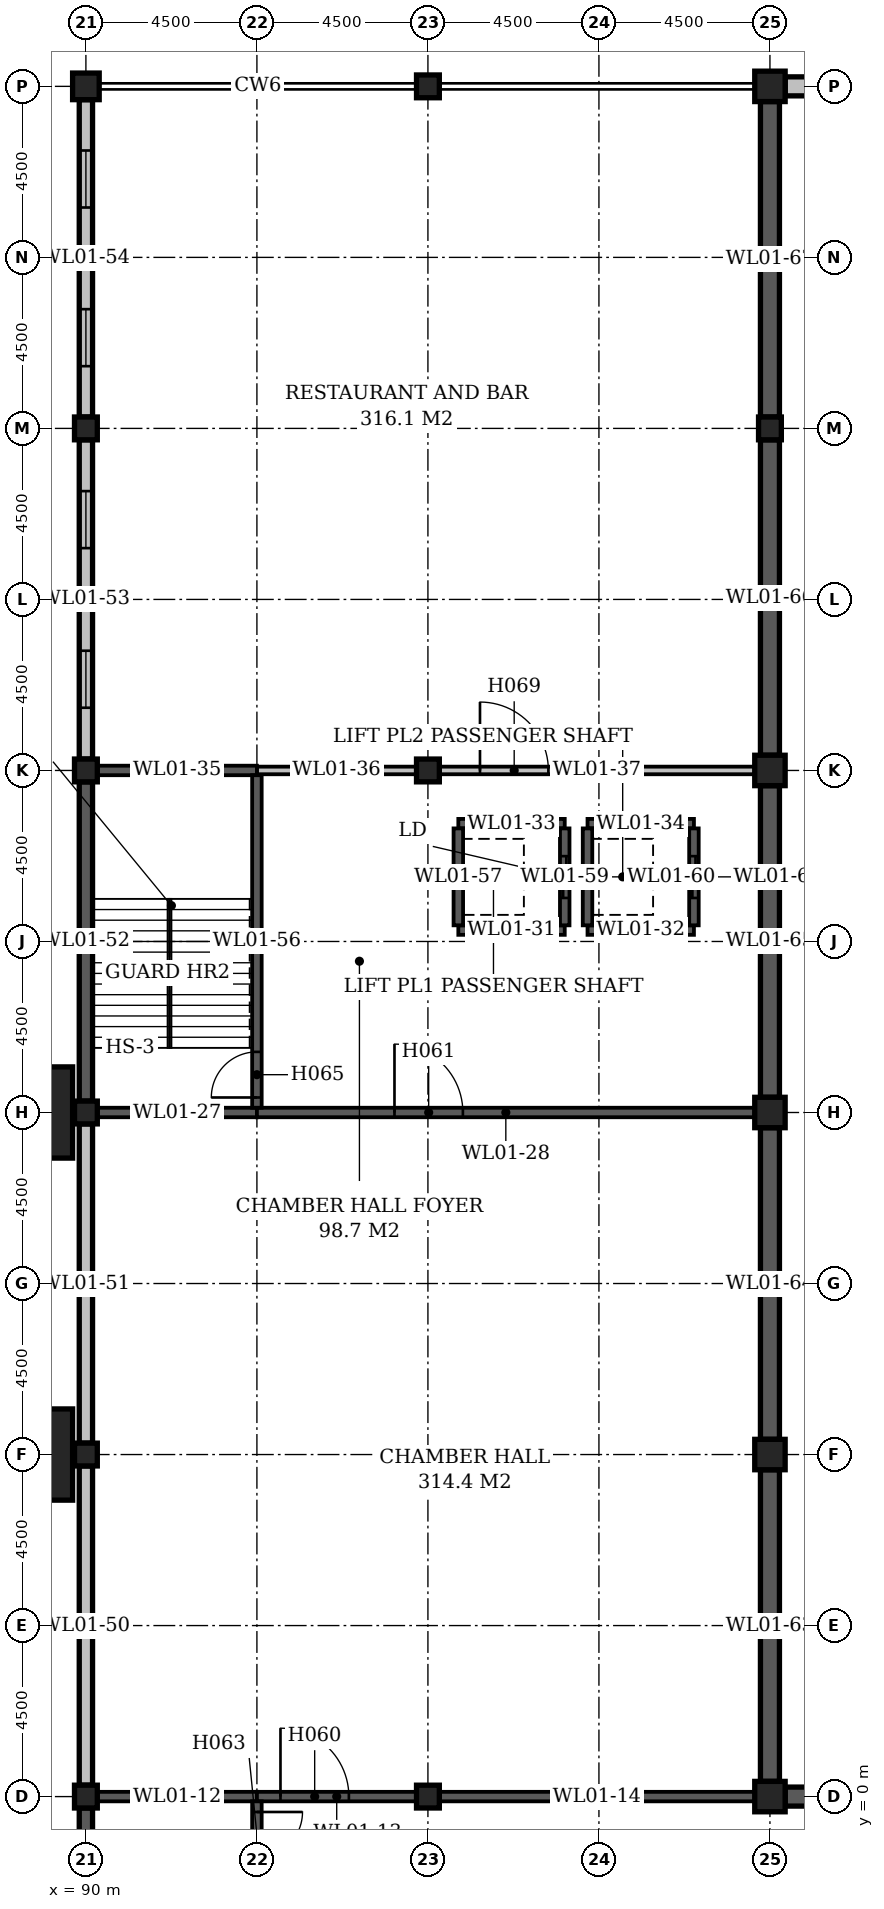
"""IFC4 building model, lengths in metres.
Left out: names, types, materials, properties, quantities, classifications, styles, units other than length and angle.
Written with IfcOpenShell. Run it as: python <this file> out.ifc"""

import sys

from ifc_helpers import new_model, si_unit, direction, frame, frame_2d, origin, origin_2d, place, context, subcontext, project, spatial, rectangle, extrude, element, fill, save


model = new_model("IFC4")
c1 = context("Model", 3, precision=1e-05, world=origin(), true_north=direction((0.0, 1.0)))
c2 = subcontext(c1, "Body", "Model", "MODEL_VIEW")
j1 = project(units=[si_unit("LENGTHUNIT", "METRE"), si_unit("PLANEANGLEUNIT", "RADIAN")], contexts=[c1])
p1 = place(None, origin())
s1 = spatial("IfcSite", under=j1, at=p1, CompositionType="ELEMENT")
p2 = place(p1, origin())
s2 = spatial("IfcBuilding", under=s1, at=p2, CompositionType="ELEMENT")
p3 = place(p2, frame((0.0, 0.0, 9.0)))
s3 = spatial("IfcBuildingStorey", under=s2, at=p3, CompositionType="ELEMENT", Elevation=9.0)
for number, where, z_axis, x_axis in (
    (1, (90.0, 0.0, 0.0), (0.0, 0.0, 1.0), (1.0, 0.0, 0.0)),
    (2, (90.0, 9.0, 0.0), (0.0, 0.0, 1.0), (1.0, 0.0, 0.0)),
    (3, (90.0, 18.0, 0.0), (0.0, 0.0, 1.0), (1.0, 0.0, 0.0)),
    (4, (90.0, 27.0, 0.0), (0.0, 0.0, 1.0), (1.0, 0.0, 0.0)),
    (5, (90.0, 36.0, 0.0), (0.0, 0.0, 1.0), (1.0, 0.0, 0.0)),
):
    element("IfcColumn", number, at=place(p3, frame(where, z_axis=z_axis, x_axis=x_axis)), inside=s3, PredefinedType="COLUMN", context=c2, shape_type="SweptSolid", body=[
        extrude(rectangle(XDim=0.6, YDim=0.6, at=origin_2d()), origin(), (0.0, 0.0, 1.0), 4.7),
    ])
p4 = place(p3, frame((90.0, 45.0, 0.0), z_axis=(0.0, 0.0, 1.0), x_axis=(1.0, 0.0, 0.0)))
e6 = element("IfcColumn", 6, at=p4, inside=s3, PredefinedType="COLUMN", context=c2, shape_type="SweptSolid", body=[
    extrude(rectangle(XDim=0.7, YDim=0.7, at=origin_2d()), origin(), (0.0, 0.0, 1.0), 4.7),
])
for number, where, z_axis, x_axis in (
    (7, (99.0, 0.0, 0.0), (0.0, 0.0, 1.0), (1.0, 0.0, 0.0)),
    (8, (99.0, 27.0, 0.0), (0.0, 0.0, 1.0), (1.0, 0.0, 0.0)),
    (9, (99.0, 45.0, 0.0), (0.0, 0.0, 1.0), (1.0, 0.0, 0.0)),
):
    element("IfcColumn", number, at=place(p3, frame(where, z_axis=z_axis, x_axis=x_axis)), inside=s3, PredefinedType="COLUMN", context=c2, shape_type="SweptSolid", body=[
        extrude(rectangle(XDim=0.6, YDim=0.6, at=origin_2d()), origin(), (0.0, 0.0, 1.0), 4.7),
    ])
for number, where, z_axis, x_axis in (
    (10, (108.0, 0.0, -0.3), (0.0, 0.0, 1.0), (1.0, 0.0, 0.0)),
    (11, (108.0, 9.0, -0.3), (0.0, 0.0, 1.0), (1.0, 0.0, 0.0)),
    (12, (108.0, 18.0, -0.3), (0.0, 0.0, 1.0), (1.0, 0.0, 0.0)),
    (13, (108.0, 27.0, -0.3), (0.0, 0.0, 1.0), (1.0, 0.0, 0.0)),
):
    element("IfcColumn", number, at=place(p3, frame(where, z_axis=z_axis, x_axis=x_axis)), inside=s3, PredefinedType="COLUMN", context=c2, shape_type="SweptSolid", body=[
        extrude(rectangle(XDim=0.8, YDim=0.8, at=origin_2d()), origin(), (0.0, 0.0, 1.0), 5.0),
    ])
p5 = place(p3, frame((108.0, 36.0, -0.3), z_axis=(0.0, 0.0, 1.0), x_axis=(1.0, 0.0, 0.0)))
e14 = element("IfcColumn", 14, at=p5, inside=s3, PredefinedType="COLUMN", context=c2, shape_type="SweptSolid", body=[
    extrude(rectangle(XDim=0.6, YDim=0.6, at=origin_2d()), origin(), (0.0, 0.0, 1.0), 5.0),
])
p6 = place(p3, frame((108.0, 45.0, -0.3), z_axis=(0.0, 0.0, 1.0), x_axis=(1.0, 0.0, 0.0)))
e15 = element("IfcColumn", 15, at=p6, inside=s3, PredefinedType="COLUMN", context=c2, shape_type="SweptSolid", body=[
    extrude(rectangle(XDim=0.8, YDim=0.8, at=origin_2d()), origin(), (0.0, 0.0, 1.0), 5.0),
])
p7 = place(p3, frame((90.3, 0.0, 0.0), z_axis=(0.0, 0.0, 1.0), x_axis=(1.0, 0.0, 0.0)))
e16 = element("IfcWall", 16, at=p7, inside=s3, PredefinedType="STANDARD", context=c2, shape_type="SweptSolid", body=[
    extrude(rectangle(XDim=4.2, YDim=0.25, at=frame_2d((2.1, 0.0))), origin(), (0.0, 0.0, 1.0), 5.0),
])
p8 = place(p3, frame((94.5, 0.0, 0.0), z_axis=(0.0, 0.0, 1.0), x_axis=(1.0, 0.0, 0.0)))
e17 = element("IfcWall", 17, at=p8, inside=s3, PredefinedType="STANDARD", context=c2, shape_type="SweptSolid", body=[
    extrude(rectangle(XDim=4.2, YDim=0.25, at=frame_2d((2.1, 0.0))), origin(), (0.0, 0.0, 1.0), 4.7),
])
p9 = place(p8, frame((0.62, 0.0, 0.0)))
e18 = element("IfcOpeningElement", 18, at=p9, cuts=e17, PredefinedType="OPENING", context=c2, shape_type="SweptSolid", body=[
    extrude(rectangle(XDim=1.8, YDim=2.4, at=frame_2d((0.9, 1.2))), frame((0.0, 0.137, 0.0), z_axis=(0.0, -1.0, 0.0), x_axis=(1.0, 0.0, 0.0)), (0.0, 0.0, 1.0), 0.274),
])
p10 = place(p3, frame((99.3, 0.0, 0.0), z_axis=(0.0, 0.0, 1.0), x_axis=(1.0, 0.0, 0.0)))
e19 = element("IfcWall", 19, at=p10, inside=s3, PredefinedType="STANDARD", context=c2, shape_type="SweptSolid", body=[
    extrude(rectangle(XDim=8.3, YDim=0.25, at=frame_2d((4.15, 0.0))), origin(), (0.0, 0.0, 1.0), 4.7),
])
p11 = place(p3, frame((108.4, 0.0, 0.0), z_axis=(0.0, 0.0, 1.0), x_axis=(1.0, 0.0, 0.0)))
e20 = element("IfcWall", 20, at=p11, inside=s3, PredefinedType="STANDARD", context=c2, shape_type="SweptSolid", body=[
    extrude(rectangle(XDim=8.3, YDim=0.5, at=frame_2d((4.15, 0.0))), origin(), (0.0, 0.0, 1.0), 5.0),
])
p12 = place(p3, frame((90.3, 18.0, 0.0), z_axis=(0.0, 0.0, 1.0), x_axis=(1.0, 0.0, 0.0)))
e21 = element("IfcWall", 21, at=p12, inside=s3, PredefinedType="STANDARD", context=c2, shape_type="SweptSolid", body=[
    extrude(rectangle(XDim=4.2, YDim=0.25, at=frame_2d((2.1, 0.0))), origin(), (0.0, 0.0, 1.0), 5.0),
])
p13 = place(p3, frame((94.5, 18.0, 0.0), z_axis=(0.0, 0.0, 1.0), x_axis=(1.0, 0.0, 0.0)))
e22 = element("IfcWall", 22, at=p13, inside=s3, PredefinedType="STANDARD", context=c2, shape_type="SweptSolid", body=[
    extrude(rectangle(XDim=13.1, YDim=0.25, at=frame_2d((6.55, 0.0))), origin(), (0.0, 0.0, 1.0), 4.7),
])
p14 = place(p13, frame((3.62, 0.0, 0.0)))
e23 = element("IfcOpeningElement", 23, at=p14, cuts=e22, PredefinedType="OPENING", context=c2, shape_type="SweptSolid", body=[
    extrude(rectangle(XDim=1.8, YDim=2.4, at=frame_2d((0.9, 1.2))), frame((0.0, 0.137, 0.0), z_axis=(0.0, -1.0, 0.0), x_axis=(1.0, 0.0, 0.0)), (0.0, 0.0, 1.0), 0.274),
])
for number, where, z_axis, x_axis in (
    (24, (99.8, 22.8, 0.0), (0.0, 0.0, 1.0), (1.0, 0.0, 0.0)),
    (25, (103.2, 22.8, 0.0), (0.0, 0.0, 1.0), (1.0, 0.0, 0.0)),
    (26, (99.8, 25.6, 0.0), (0.0, 0.0, 1.0), (1.0, 0.0, 0.0)),
    (27, (103.2, 25.6, 0.0), (0.0, 0.0, 1.0), (1.0, 0.0, 0.0)),
):
    element("IfcWall", number, at=place(p3, frame(where, z_axis=z_axis, x_axis=x_axis)), inside=s3, PredefinedType="STANDARD", context=c2, shape_type="SweptSolid", body=[
        extrude(rectangle(XDim=2.8, YDim=0.25, at=frame_2d((1.4, 0.0))), origin(), (0.0, 0.0, 1.0), 5.0),
    ])
p15 = place(p3, frame((90.3, 27.0, 0.0), z_axis=(0.0, 0.0, 1.0), x_axis=(1.0, 0.0, 0.0)))
e28 = element("IfcWall", 28, at=p15, inside=s3, PredefinedType="STANDARD", context=c2, shape_type="SweptSolid", body=[
    extrude(rectangle(XDim=4.2, YDim=0.25, at=frame_2d((2.1, 0.0))), origin(), (0.0, 0.0, 1.0), 5.0),
])
p16 = place(p3, frame((94.5, 27.0, 0.0), z_axis=(0.0, 0.0, 1.0), x_axis=(1.0, 0.0, 0.0)))
e29 = element("IfcWall", 29, at=p16, inside=s3, PredefinedType="STANDARD", context=c2, shape_type="SweptSolid", body=[
    extrude(rectangle(XDim=4.2, YDim=0.2, at=frame_2d((2.1, 0.0))), origin(), (0.0, 0.0, 1.0), 4.7),
])
p17 = place(p3, frame((99.3, 27.0, 0.0), z_axis=(0.0, 0.0, 1.0), x_axis=(1.0, 0.0, 0.0)))
e30 = element("IfcWall", 30, at=p17, inside=s3, PredefinedType="STANDARD", context=c2, shape_type="SweptSolid", body=[
    extrude(rectangle(XDim=8.3, YDim=0.2, at=frame_2d((4.15, 0.0))), origin(), (0.0, 0.0, 1.0), 4.7),
])
p18 = place(p17, frame((1.07, 0.0, 0.0)))
e31 = element("IfcOpeningElement", 31, at=p18, cuts=e30, PredefinedType="OPENING", context=c2, shape_type="SweptSolid", body=[
    extrude(rectangle(XDim=1.8, YDim=2.4, at=frame_2d((0.9, 1.2))), frame((0.0, 0.112, 0.0), z_axis=(0.0, -1.0, 0.0), x_axis=(1.0, 0.0, 0.0)), (0.0, 0.0, 1.0), 0.224),
])
p19 = place(p3, frame((108.4, 45.0, 0.0), z_axis=(0.0, 0.0, 1.0), x_axis=(1.0, 0.0, 0.0)))
e32 = element("IfcWall", 32, at=p19, inside=s3, PredefinedType="STANDARD", context=c2, shape_type="SweptSolid", body=[
    extrude(rectangle(XDim=8.3, YDim=0.5, at=frame_2d((4.15, 0.0))), origin(), (0.0, 0.0, 1.0), 5.0),
])
p20 = place(p3, frame((90.0, -8.65, 0.0), z_axis=(0.0, 0.0, 1.0), x_axis=(0.0, 1.0, 0.0)))
e33 = element("IfcWall", 33, at=p20, inside=s3, PredefinedType="STANDARD", context=c2, shape_type="SweptSolid", body=[
    extrude(rectangle(XDim=8.35, YDim=0.35, at=frame_2d((4.175, 0.0))), origin(), (0.0, 0.0, 1.0), 5.0),
])
for number, where, z_axis, x_axis in (
    (34, (90.0, 0.3, 0.0), (0.0, 0.0, 1.0), (0.0, 1.0, 0.0)),
    (35, (90.0, 9.3, 0.0), (0.0, 0.0, 1.0), (0.0, 1.0, 0.0)),
):
    element("IfcWall", number, at=place(p3, frame(where, z_axis=z_axis, x_axis=x_axis)), inside=s3, PredefinedType="STANDARD", context=c2, shape_type="SweptSolid", body=[
        extrude(rectangle(XDim=8.4, YDim=0.35, at=frame_2d((4.2, 0.0))), origin(), (0.0, 0.0, 1.0), 4.1),
    ])
p21 = place(p3, frame((90.0, 18.3, 0.0), z_axis=(0.0, 0.0, 1.0), x_axis=(0.0, 1.0, 0.0)))
e36 = element("IfcWall", 36, at=p21, inside=s3, PredefinedType="STANDARD", context=c2, shape_type="SweptSolid", body=[
    extrude(rectangle(XDim=8.4, YDim=0.35, at=frame_2d((4.2, 0.0))), origin(), (0.0, 0.0, 1.0), 5.0),
])
p22 = place(p3, frame((90.0, 27.3, 0.0), z_axis=(0.0, 0.0, 1.0), x_axis=(0.0, 1.0, 0.0)))
e37 = element("IfcWall", 37, at=p22, inside=s3, PredefinedType="STANDARD", context=c2, shape_type="SweptSolid", body=[
    extrude(rectangle(XDim=8.4, YDim=0.35, at=frame_2d((4.2, 0.0))), origin(), (0.0, 0.0, 1.0), 4.1),
])
p23 = place(p22, frame((1.35, 0.0, 1.0)))
e38 = element("IfcOpeningElement", 38, at=p23, cuts=e37, PredefinedType="OPENING", context=c2, shape_type="SweptSolid", body=[
    extrude(rectangle(XDim=1.5, YDim=2.4, at=frame_2d((0.75, 1.2))), frame((0.0, 0.187, 0.0), z_axis=(0.0, -1.0, 0.0), x_axis=(1.0, 0.0, 0.0)), (0.0, 0.0, 1.0), 0.374),
])
p24 = place(p22, frame((5.55, 0.0, 1.0)))
e39 = element("IfcOpeningElement", 39, at=p24, cuts=e37, PredefinedType="OPENING", context=c2, shape_type="SweptSolid", body=[
    extrude(rectangle(XDim=1.5, YDim=2.4, at=frame_2d((0.75, 1.2))), frame((0.0, 0.187, 0.0), z_axis=(0.0, -1.0, 0.0), x_axis=(1.0, 0.0, 0.0)), (0.0, 0.0, 1.0), 0.374),
])
p25 = place(p3, frame((90.0, 36.3, 0.0), z_axis=(0.0, 0.0, 1.0), x_axis=(0.0, 1.0, 0.0)))
e40 = element("IfcWall", 40, at=p25, inside=s3, PredefinedType="STANDARD", context=c2, shape_type="SweptSolid", body=[
    extrude(rectangle(XDim=8.35, YDim=0.35, at=frame_2d((4.175, 0.0))), origin(), (0.0, 0.0, 1.0), 4.1),
])
p26 = place(p25, frame((1.337, 0.0, 1.0)))
e41 = element("IfcOpeningElement", 41, at=p26, cuts=e40, PredefinedType="OPENING", context=c2, shape_type="SweptSolid", body=[
    extrude(rectangle(XDim=1.5, YDim=2.4, at=frame_2d((0.75, 1.2))), frame((0.0, 0.187, 0.0), z_axis=(0.0, -1.0, 0.0), x_axis=(1.0, 0.0, 0.0)), (0.0, 0.0, 1.0), 0.374),
])
p27 = place(p25, frame((5.512, 0.0, 1.0)))
e42 = element("IfcOpeningElement", 42, at=p27, cuts=e40, PredefinedType="OPENING", context=c2, shape_type="SweptSolid", body=[
    extrude(rectangle(XDim=1.5, YDim=2.4, at=frame_2d((0.75, 1.2))), frame((0.0, 0.187, 0.0), z_axis=(0.0, -1.0, 0.0), x_axis=(1.0, 0.0, 0.0)), (0.0, 0.0, 1.0), 0.374),
])
p28 = place(p3, frame((94.5, -8.825, 0.0), z_axis=(0.0, 0.0, 1.0), x_axis=(0.0, 1.0, 0.0)))
e43 = element("IfcWall", 43, at=p28, inside=s3, PredefinedType="STANDARD", context=c2, shape_type="SweptSolid", body=[
    extrude(rectangle(XDim=8.7, YDim=0.25, at=frame_2d((4.35, 0.0))), origin(), (0.0, 0.0, 1.0), 5.0),
])
p29 = place(p28, frame((7.22, 0.0, 0.0)))
e44 = element("IfcOpeningElement", 44, at=p29, cuts=e43, PredefinedType="OPENING", context=c2, shape_type="SweptSolid", body=[
    extrude(rectangle(XDim=1.2, YDim=2.1, at=frame_2d((0.6, 1.05))), frame((0.0, 0.137, 0.0), z_axis=(0.0, -1.0, 0.0), x_axis=(1.0, 0.0, 0.0)), (0.0, 0.0, 1.0), 0.274),
])
p30 = place(p3, frame((94.5, 18.125, 0.0), z_axis=(0.0, 0.0, 1.0), x_axis=(0.0, 1.0, 0.0)))
e45 = element("IfcWall", 45, at=p30, inside=s3, PredefinedType="STANDARD", context=c2, shape_type="SweptSolid", body=[
    extrude(rectangle(XDim=8.75, YDim=0.25, at=frame_2d((4.375, 0.0))), origin(), (0.0, 0.0, 1.0), 5.0),
])
p31 = place(p30, frame((0.27, 0.0, 0.0)))
e46 = element("IfcOpeningElement", 46, at=p31, cuts=e45, PredefinedType="OPENING", context=c2, shape_type="SweptSolid", body=[
    extrude(rectangle(XDim=1.2, YDim=2.1, at=frame_2d((0.6, 1.05))), frame((0.0, 0.137, 0.0), z_axis=(0.0, -1.0, 0.0), x_axis=(1.0, 0.0, 0.0)), (0.0, 0.0, 1.0), 0.274),
])
p32 = place(p3, frame((99.8, 22.925, 0.0), z_axis=(0.0, 0.0, 1.0), x_axis=(0.0, 1.0, 0.0)))
e47 = element("IfcWall", 47, at=p32, inside=s3, PredefinedType="STANDARD", context=c2, shape_type="SweptSolid", body=[
    extrude(rectangle(XDim=2.55, YDim=0.25, at=frame_2d((1.275, 0.0))), origin(), (0.0, 0.0, 1.0), 5.0),
])
p33 = place(p3, frame((102.6, 22.925, 0.0), z_axis=(0.0, 0.0, 1.0), x_axis=(0.0, 1.0, 0.0)))
e48 = element("IfcWall", 48, at=p33, inside=s3, PredefinedType="STANDARD", context=c2, shape_type="SweptSolid", body=[
    extrude(rectangle(XDim=2.55, YDim=0.25, at=frame_2d((1.275, 0.0))), origin(), (0.0, 0.0, 1.0), 5.0),
])
p34 = place(p33, frame((0.72, 0.0, 0.0)))
e49 = element("IfcOpeningElement", 49, at=p34, cuts=e48, PredefinedType="OPENING", context=c2, shape_type="SweptSolid", body=[
    extrude(rectangle(XDim=1.1, YDim=2.1, at=frame_2d((0.55, 1.05))), frame((0.0, 0.137, 0.0), z_axis=(0.0, -1.0, 0.0), x_axis=(1.0, 0.0, 0.0)), (0.0, 0.0, 1.0), 0.274),
])
p35 = place(p3, frame((103.2, 22.925, 0.0), z_axis=(0.0, 0.0, 1.0), x_axis=(0.0, 1.0, 0.0)))
e50 = element("IfcWall", 50, at=p35, inside=s3, PredefinedType="STANDARD", context=c2, shape_type="SweptSolid", body=[
    extrude(rectangle(XDim=2.55, YDim=0.25, at=frame_2d((1.275, 0.0))), origin(), (0.0, 0.0, 1.0), 5.0),
])
p36 = place(p3, frame((106.0, 22.925, 0.0), z_axis=(0.0, 0.0, 1.0), x_axis=(0.0, 1.0, 0.0)))
e51 = element("IfcWall", 51, at=p36, inside=s3, PredefinedType="STANDARD", context=c2, shape_type="SweptSolid", body=[
    extrude(rectangle(XDim=2.55, YDim=0.25, at=frame_2d((1.275, 0.0))), origin(), (0.0, 0.0, 1.0), 5.0),
])
p37 = place(p36, frame((0.72, 0.0, 0.0)))
e52 = element("IfcOpeningElement", 52, at=p37, cuts=e51, PredefinedType="OPENING", context=c2, shape_type="SweptSolid", body=[
    extrude(rectangle(XDim=1.1, YDim=2.1, at=frame_2d((0.55, 1.05))), frame((0.0, 0.137, 0.0), z_axis=(0.0, -1.0, 0.0), x_axis=(1.0, 0.0, 0.0)), (0.0, 0.0, 1.0), 0.274),
])
for number, where, z_axis, x_axis in (
    (53, (108.0, 0.4, 0.0), (0.0, 0.0, 1.0), (0.0, 1.0, 0.0)),
    (54, (108.0, 9.4, 0.0), (0.0, 0.0, 1.0), (0.0, 1.0, 0.0)),
    (55, (108.0, 18.4, 0.0), (0.0, 0.0, 1.0), (0.0, 1.0, 0.0)),
):
    element("IfcWall", number, at=place(p3, frame(where, z_axis=z_axis, x_axis=x_axis)), inside=s3, PredefinedType="STANDARD", context=c2, shape_type="SweptSolid", body=[
        extrude(rectangle(XDim=8.2, YDim=0.5, at=frame_2d((4.1, 0.0))), origin(), (0.0, 0.0, 1.0), 5.0),
    ])
for number, where, z_axis, x_axis in (
    (56, (108.0, 27.4, 0.0), (0.0, 0.0, 1.0), (0.0, 1.0, 0.0)),
    (57, (108.0, 36.3, 0.0), (0.0, 0.0, 1.0), (0.0, 1.0, 0.0)),
):
    element("IfcWall", number, at=place(p3, frame(where, z_axis=z_axis, x_axis=x_axis)), inside=s3, PredefinedType="STANDARD", context=c2, shape_type="SweptSolid", body=[
        extrude(rectangle(XDim=8.3, YDim=0.5, at=frame_2d((4.15, 0.0))), origin(), (0.0, 0.0, 1.0), 5.0),
    ])
for number, where, z_axis, x_axis in (
    (58, (88.85, 9.0, 0.0), (0.0, 0.0, 1.0), (1.0, 0.0, 0.0)),
    (59, (88.85, 18.0, 0.0), (0.0, 0.0, 1.0), (1.0, 0.0, 0.0)),
):
    element("IfcColumn", number, at=place(p3, frame(where, z_axis=z_axis, x_axis=x_axis)), inside=s3, PredefinedType="COLUMN", context=c2, shape_type="SweptSolid", body=[
        extrude(rectangle(XDim=1.6, YDim=2.4, at=origin_2d()), origin(), (0.0, 0.0, 1.0), 5.0),
    ])
p38 = place(p9, origin())
e60 = element("IfcDoor", 60, at=p38, inside=s3, OperationType="DOUBLE_DOOR_SINGLE_SWING", PredefinedType="DOOR", context=c2, shape_type="SweptSolid", body=[
    extrude(rectangle(XDim=1.8, YDim=2.4, at=frame_2d((0.9, 1.2))), frame((0.0, 0.025, 0.0), z_axis=(0.0, -1.0, 0.0), x_axis=(1.0, 0.0, 0.0)), (0.0, 0.0, 1.0), 0.05),
])
fill(e18, e60)
p39 = place(p14, origin())
e61 = element("IfcDoor", 61, at=p39, inside=s3, OperationType="DOUBLE_DOOR_SINGLE_SWING", PredefinedType="DOOR", context=c2, shape_type="SweptSolid", body=[
    extrude(rectangle(XDim=1.8, YDim=2.4, at=frame_2d((0.9, 1.2))), frame((0.0, 0.025, 0.0), z_axis=(0.0, -1.0, 0.0), x_axis=(1.0, 0.0, 0.0)), (0.0, 0.0, 1.0), 0.05),
])
fill(e23, e61)
p40 = place(p29, origin())
e62 = element("IfcDoor", 62, at=p40, inside=s3, OperationType="SINGLE_SWING_RIGHT", PredefinedType="DOOR", context=c2, shape_type="SweptSolid", body=[
    extrude(rectangle(XDim=1.2, YDim=2.1, at=frame_2d((0.6, 1.05))), frame((0.0, 0.025, 0.0), z_axis=(0.0, -1.0, 0.0), x_axis=(1.0, 0.0, 0.0)), (0.0, 0.0, 1.0), 0.05),
])
fill(e44, e62)
p41 = place(p31, origin())
e63 = element("IfcDoor", 63, at=p41, inside=s3, OperationType="SINGLE_SWING_LEFT", PredefinedType="DOOR", context=c2, shape_type="SweptSolid", body=[
    extrude(rectangle(XDim=1.2, YDim=2.1, at=frame_2d((0.6, 1.05))), frame((0.0, 0.025, 0.0), z_axis=(0.0, -1.0, 0.0), x_axis=(1.0, 0.0, 0.0)), (0.0, 0.0, 1.0), 0.05),
])
fill(e46, e63)
p42 = place(p18, origin())
e64 = element("IfcDoor", 64, at=p42, inside=s3, OperationType="DOUBLE_DOOR_SINGLE_SWING", PredefinedType="DOOR", context=c2, shape_type="SweptSolid", body=[
    extrude(rectangle(XDim=1.8, YDim=2.4, at=frame_2d((0.9, 1.2))), frame((0.0, 0.025, 0.0), z_axis=(0.0, -1.0, 0.0), x_axis=(1.0, 0.0, 0.0)), (0.0, 0.0, 1.0), 0.05),
])
fill(e31, e64)
p43 = place(p34, origin())
e65 = element("IfcDoor", 65, at=p43, inside=s3, OperationType="SLIDING_TO_LEFT", PredefinedType="DOOR", context=c2, shape_type="SweptSolid", body=[
    extrude(rectangle(XDim=1.1, YDim=2.1, at=frame_2d((0.55, 1.05))), frame((0.0, 0.025, 0.0), z_axis=(0.0, -1.0, 0.0), x_axis=(1.0, 0.0, 0.0)), (0.0, 0.0, 1.0), 0.05),
])
fill(e49, e65)
p44 = place(p37, origin())
e66 = element("IfcDoor", 66, at=p44, inside=s3, OperationType="SLIDING_TO_LEFT", PredefinedType="DOOR", context=c2, shape_type="SweptSolid", body=[
    extrude(rectangle(XDim=1.1, YDim=2.1, at=frame_2d((0.55, 1.05))), frame((0.0, 0.025, 0.0), z_axis=(0.0, -1.0, 0.0), x_axis=(1.0, 0.0, 0.0)), (0.0, 0.0, 1.0), 0.05),
])
fill(e52, e66)
p45 = place(p23, origin())
e67 = element("IfcWindow", 67, at=p45, inside=s3, PartitioningType="SINGLE_PANEL", PredefinedType="WINDOW", context=c2, shape_type="SweptSolid", body=[
    extrude(rectangle(XDim=1.5, YDim=2.4, at=frame_2d((0.75, 1.2))), frame((0.0, 0.03, 0.0), z_axis=(0.0, -1.0, 0.0), x_axis=(1.0, 0.0, 0.0)), (0.0, 0.0, 1.0), 0.06),
])
fill(e38, e67)
p46 = place(p24, origin())
e68 = element("IfcWindow", 68, at=p46, inside=s3, PartitioningType="SINGLE_PANEL", PredefinedType="WINDOW", context=c2, shape_type="SweptSolid", body=[
    extrude(rectangle(XDim=1.5, YDim=2.4, at=frame_2d((0.75, 1.2))), frame((0.0, 0.03, 0.0), z_axis=(0.0, -1.0, 0.0), x_axis=(1.0, 0.0, 0.0)), (0.0, 0.0, 1.0), 0.06),
])
fill(e39, e68)
p47 = place(p26, origin())
e69 = element("IfcWindow", 69, at=p47, inside=s3, PartitioningType="SINGLE_PANEL", PredefinedType="WINDOW", context=c2, shape_type="SweptSolid", body=[
    extrude(rectangle(XDim=1.5, YDim=2.4, at=frame_2d((0.75, 1.2))), frame((0.0, 0.03, 0.0), z_axis=(0.0, -1.0, 0.0), x_axis=(1.0, 0.0, 0.0)), (0.0, 0.0, 1.0), 0.06),
])
fill(e41, e69)
p48 = place(p27, origin())
e70 = element("IfcWindow", 70, at=p48, inside=s3, PartitioningType="SINGLE_PANEL", PredefinedType="WINDOW", context=c2, shape_type="SweptSolid", body=[
    extrude(rectangle(XDim=1.5, YDim=2.4, at=frame_2d((0.75, 1.2))), frame((0.0, 0.03, 0.0), z_axis=(0.0, -1.0, 0.0), x_axis=(1.0, 0.0, 0.0)), (0.0, 0.0, 1.0), 0.06),
])
fill(e42, e70)
save(model, sys.argv[1])
